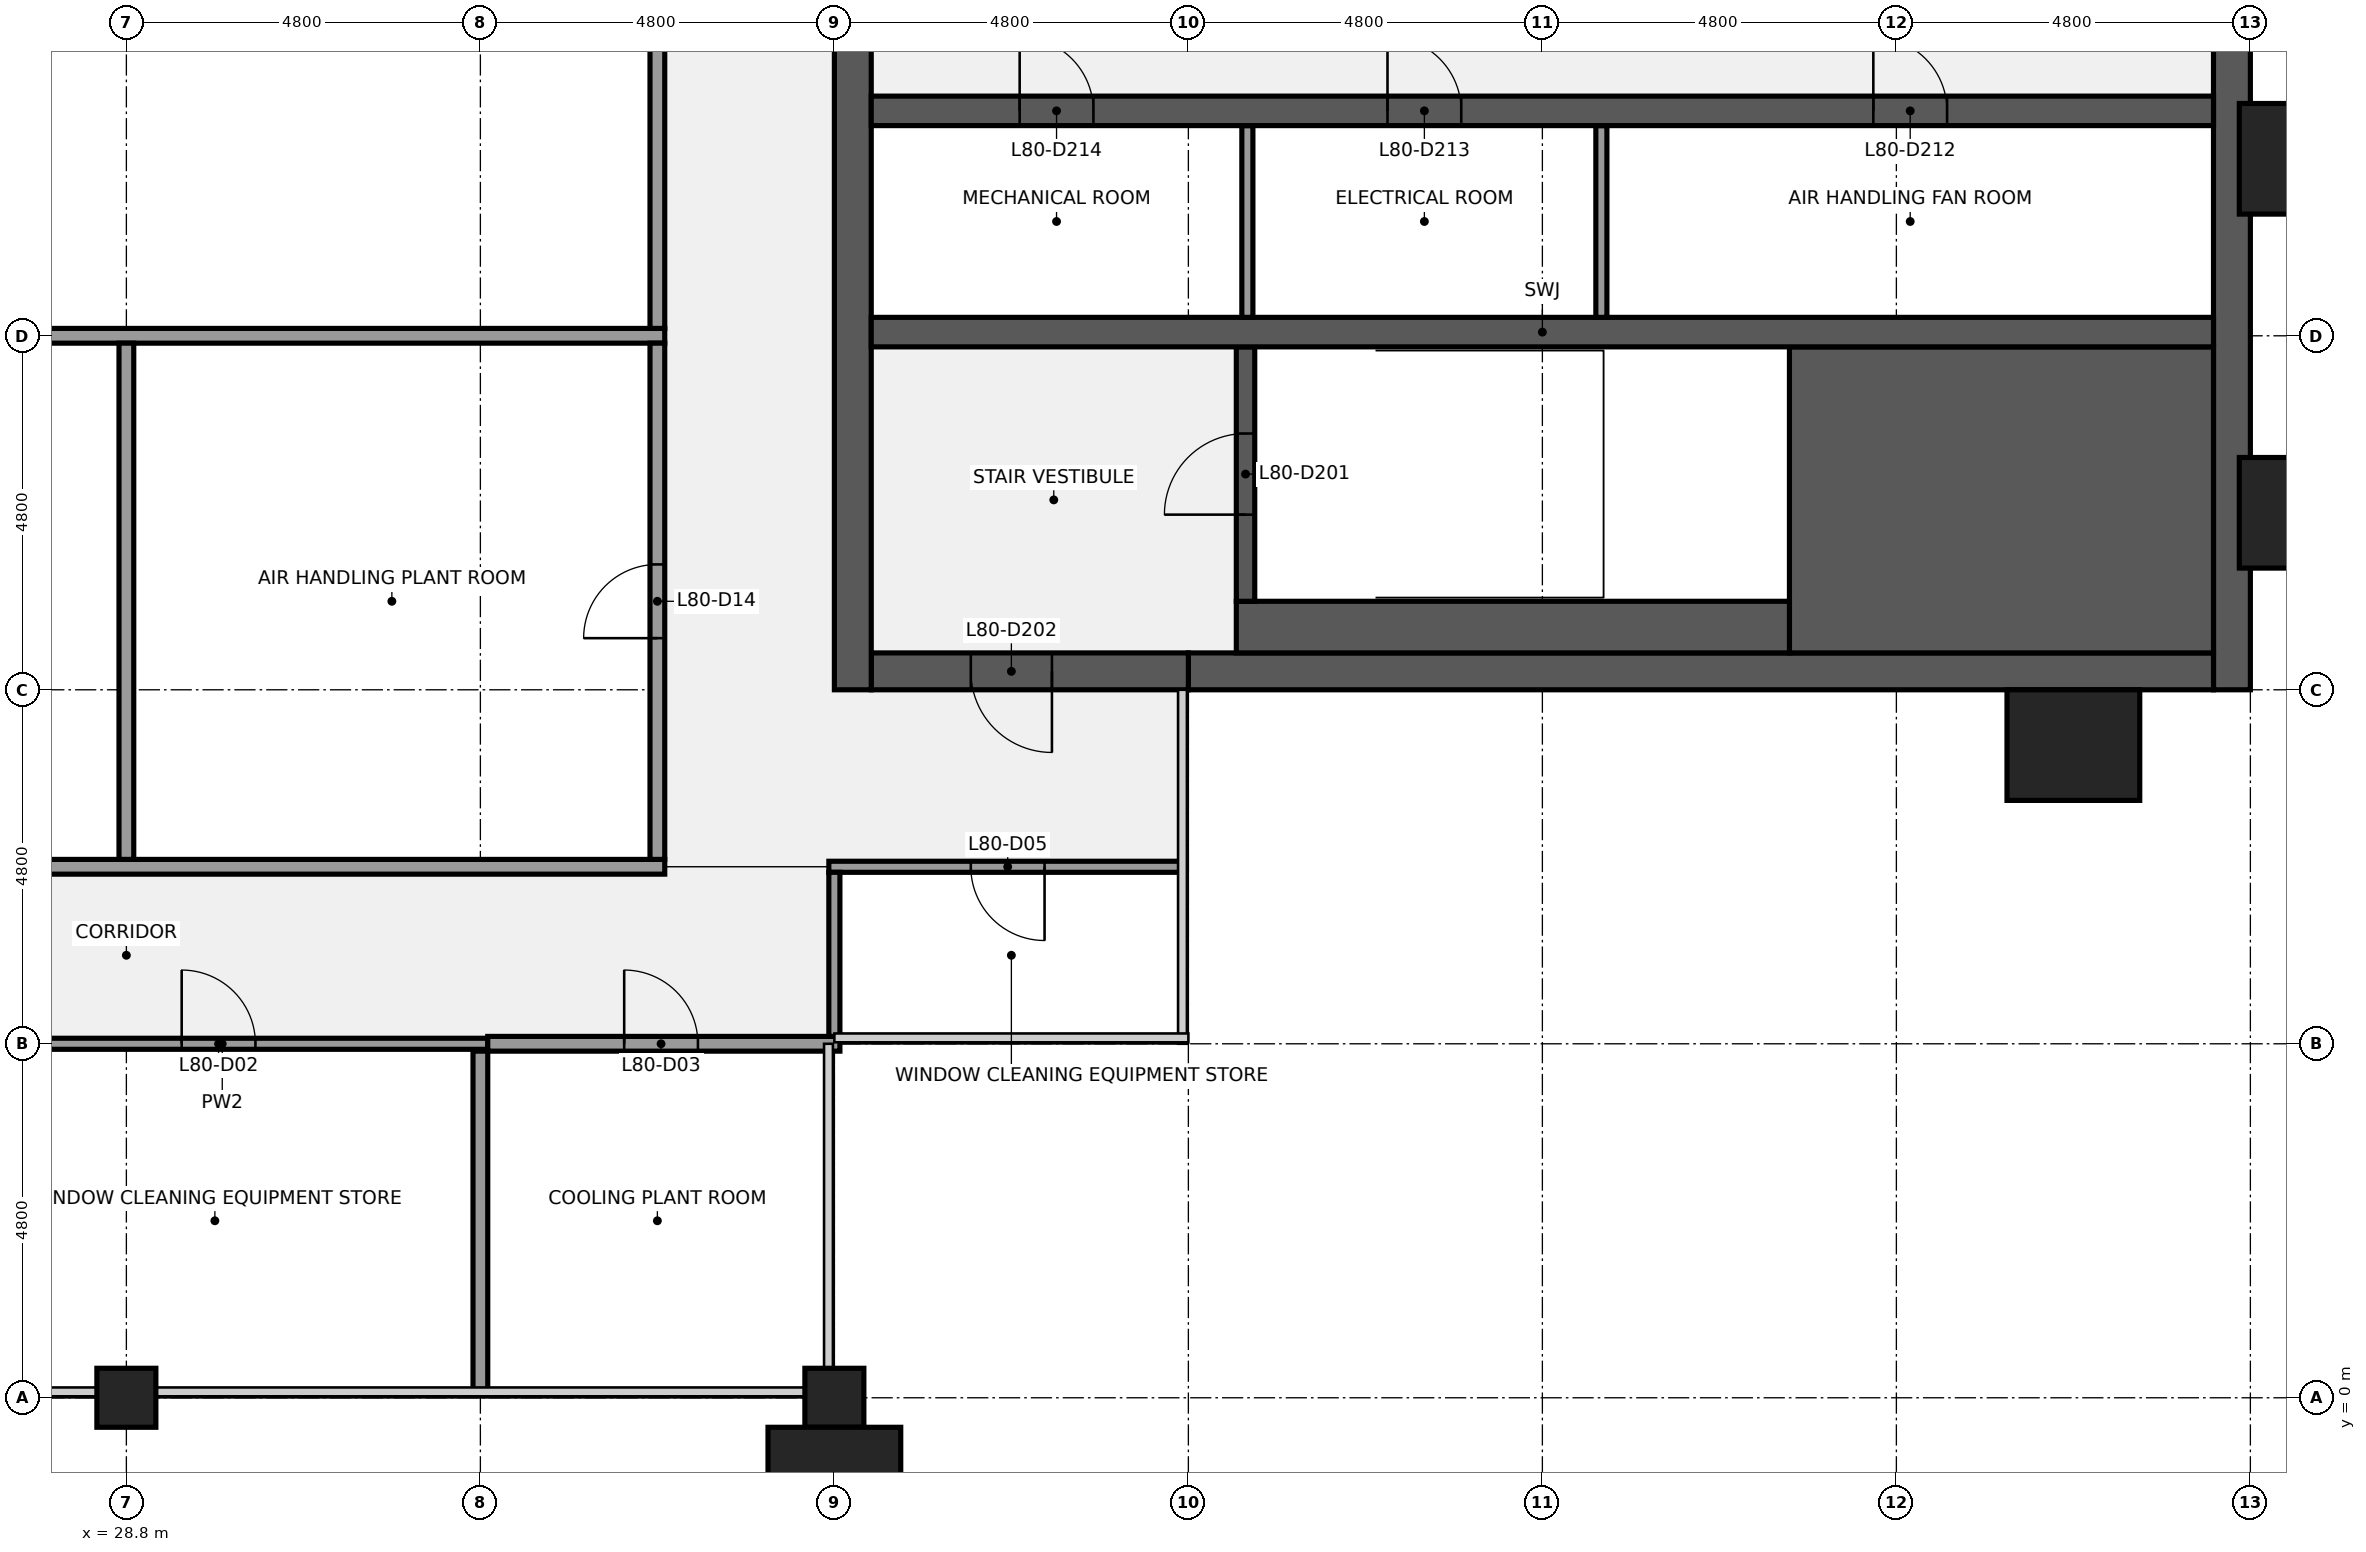
"""IFC4 building model, lengths in metres.
Left out: names, types, materials, properties, quantities, classifications, styles, units other than length and angle.
Written with IfcOpenShell. Run it as: python <this file> out.ifc"""

import sys

from ifc_helpers import new_model, si_unit, direction, frame, frame_2d, origin, origin_2d, place, context, subcontext, project, spatial, rectangle, extrude, element, fill, save


model = new_model("IFC4")
c1 = context("Model", 3, precision=1e-05, world=origin(), true_north=direction((0.0, 1.0)))
c2 = subcontext(c1, "Body", "Model", "MODEL_VIEW")
j1 = project(units=[si_unit("LENGTHUNIT", "METRE"), si_unit("PLANEANGLEUNIT", "RADIAN")], contexts=[c1])
p1 = place(None, origin())
s1 = spatial("IfcSite", under=j1, at=p1, CompositionType="ELEMENT")
p2 = place(p1, origin())
s2 = spatial("IfcBuilding", under=s1, at=p2, CompositionType="ELEMENT")
p3 = place(p2, frame((0.0, 0.0, 358.3)))
s3 = spatial("IfcBuildingStorey", under=s2, at=p3, CompositionType="ELEMENT", Elevation=358.3)
for number, where, z_axis, x_axis in (
    (1, (28.8, 0.0, 0.0), (0.0, 0.0, 1.0), (1.0, 0.0, 0.0)),
    (2, (38.4, 0.0, 0.0), (0.0, 0.0, 1.0), (1.0, 0.0, 0.0)),
):
    element("IfcColumn", number, at=place(p3, frame(where, z_axis=z_axis, x_axis=x_axis)), inside=s3, PredefinedType="COLUMN", context=c2, shape_type="SweptSolid", body=[
        extrude(rectangle(XDim=0.8, YDim=0.8, at=origin_2d()), origin(), (0.0, 0.0, 1.0), 3.942),
    ])
p4 = place(p3, frame((57.35, 38.4, 0.0), z_axis=(0.0, 0.0, 1.0), x_axis=(0.0, -1.0, 0.0)))
e3 = element("IfcWall", 3, at=p4, inside=s3, PredefinedType="SHEAR", context=c2, shape_type="SweptSolid", body=[
    extrude(rectangle(XDim=28.8, YDim=0.5, at=frame_2d((14.4, 0.0))), origin(), (0.0, 0.0, 1.0), 3.75),
])
p5 = place(p3, frame((57.1, 9.85, 0.0), z_axis=(0.0, 0.0, 1.0), x_axis=(-1.0, 0.0, 0.0)))
e4 = element("IfcWall", 4, at=p5, inside=s3, PredefinedType="SHEAR", context=c2, shape_type="SweptSolid", body=[
    extrude(rectangle(XDim=13.9, YDim=0.5, at=frame_2d((6.95, 0.0))), origin(), (0.0, 0.0, 1.0), 3.75),
])
p6 = place(p3, frame((43.2, 9.85, 0.0), z_axis=(0.0, 0.0, 1.0), x_axis=(-1.0, 0.0, 0.0)))
e5 = element("IfcWall", 5, at=p6, inside=s3, PredefinedType="SHEAR", context=c2, shape_type="SweptSolid", body=[
    extrude(rectangle(XDim=4.3, YDim=0.5, at=frame_2d((2.15, 0.0))), origin(), (0.0, 0.0, 1.0), 3.75),
])
p7 = place(p6, frame((1.85, 0.0, 0.0)))
e6 = element("IfcOpeningElement", 6, at=p7, cuts=e5, PredefinedType="OPENING", context=c2, shape_type="SweptSolid", body=[
    extrude(rectangle(XDim=1.1, YDim=2.1, at=frame_2d((0.55, 1.05))), frame((0.0, 0.26, 0.0), z_axis=(0.0, -1.0, 0.0), x_axis=(1.0, 0.0, 0.0)), (0.0, 0.0, 1.0), 0.52),
])
p8 = place(p3, frame((38.65, 9.6, 0.0), z_axis=(0.0, 0.0, 1.0), x_axis=(0.0, 1.0, 0.0)))
e7 = element("IfcWall", 7, at=p8, inside=s3, PredefinedType="SHEAR", context=c2, shape_type="SweptSolid", body=[
    extrude(rectangle(XDim=28.8, YDim=0.5, at=frame_2d((14.4, 0.0))), origin(), (0.0, 0.0, 1.0), 3.75),
])
p9 = place(p8, frame((8.7, 0.0, 0.0)))
e8 = element("IfcOpeningElement", 8, at=p9, cuts=e7, PredefinedType="OPENING", context=c2, shape_type="SweptSolid", body=[
    extrude(rectangle(XDim=1.8, YDim=2.1, at=frame_2d((0.9, 1.05))), frame((0.0, 0.26, 0.0), z_axis=(0.0, -1.0, 0.0), x_axis=(1.0, 0.0, 0.0)), (0.0, 0.0, 1.0), 0.52),
])
p10 = place(p8, frame((18.3, 0.0, 0.0)))
e9 = element("IfcOpeningElement", 9, at=p10, cuts=e7, PredefinedType="OPENING", context=c2, shape_type="SweptSolid", body=[
    extrude(rectangle(XDim=1.8, YDim=2.1, at=frame_2d((0.9, 1.05))), frame((0.0, 0.26, 0.0), z_axis=(0.0, -1.0, 0.0), x_axis=(1.0, 0.0, 0.0)), (0.0, 0.0, 1.0), 0.52),
])
p11 = place(p3, frame((51.35, 12.175, 0.0), z_axis=(0.0, 0.0, 1.0), x_axis=(1.0, 0.0, 0.0)))
e10 = element("IfcWall", 10, at=p11, inside=s3, PredefinedType="SHEAR", context=c2, shape_type="SweptSolid", body=[
    extrude(rectangle(XDim=5.75, YDim=4.15, at=frame_2d((2.875, 0.0))), origin(), (0.0, 0.0, 1.0), 3.75),
])
p12 = place(p3, frame((43.85, 10.45, 0.0), z_axis=(0.0, 0.0, 1.0), x_axis=(1.0, 0.0, 0.0)))
e11 = element("IfcWall", 11, at=p12, inside=s3, PredefinedType="SHEAR", context=c2, shape_type="SweptSolid", body=[
    extrude(rectangle(XDim=7.5, YDim=0.7, at=frame_2d((3.75, 0.0))), origin(), (0.0, 0.0, 1.0), 3.75),
])
p13 = place(p3, frame((43.975, 10.8, 0.0), z_axis=(0.0, 0.0, 1.0), x_axis=(0.0, 1.0, 0.0)))
e12 = element("IfcWall", 12, at=p13, inside=s3, PredefinedType="SHEAR", context=c2, shape_type="SweptSolid", body=[
    extrude(rectangle(XDim=3.45, YDim=0.25, at=frame_2d((1.725, 0.0))), origin(), (0.0, 0.0, 1.0), 3.75),
])
p14 = place(p13, frame((1.175, 0.0, 0.0)))
e13 = element("IfcOpeningElement", 13, at=p14, cuts=e12, PredefinedType="OPENING", context=c2, shape_type="SweptSolid", body=[
    extrude(rectangle(XDim=1.1, YDim=2.1, at=frame_2d((0.55, 1.05))), frame((0.0, 0.135, 0.0), z_axis=(0.0, -1.0, 0.0), x_axis=(1.0, 0.0, 0.0)), (0.0, 0.0, 1.0), 0.27),
])
p15 = place(p3, frame((38.9, 14.45, 0.0), z_axis=(0.0, 0.0, 1.0), x_axis=(1.0, 0.0, 0.0)))
e14 = element("IfcWall", 14, at=p15, inside=s3, PredefinedType="SHEAR", context=c2, shape_type="SweptSolid", body=[
    extrude(rectangle(XDim=18.2, YDim=0.4, at=frame_2d((9.1, 0.0))), origin(), (0.0, 0.0, 1.0), 3.75),
])
for number, where, z_axis, x_axis in (
    (15, (48.8, 14.65, 0.0), (0.0, 0.0, 1.0), (0.0, 1.0, 0.0)),
    (16, (44.0, 14.65, 0.0), (0.0, 0.0, 1.0), (0.0, 1.0, 0.0)),
):
    element("IfcWall", number, at=place(p3, frame(where, z_axis=z_axis, x_axis=x_axis)), inside=s3, PredefinedType="PARTITIONING", context=c2, shape_type="SweptSolid", body=[
        extrude(rectangle(XDim=2.6, YDim=0.15, at=frame_2d((1.3, 0.0))), origin(), (0.0, 0.0, 1.0), 3.75),
    ])
p16 = place(p3, frame((38.9, 17.45, 0.0), z_axis=(0.0, 0.0, 1.0), x_axis=(1.0, 0.0, 0.0)))
e17 = element("IfcWall", 17, at=p16, inside=s3, PredefinedType="SHEAR", context=c2, shape_type="SweptSolid", body=[
    extrude(rectangle(XDim=18.2, YDim=0.4, at=frame_2d((9.1, 0.0))), origin(), (0.0, 0.0, 1.0), 3.75),
])
p17 = place(p16, frame((13.587, 0.0, 0.0)))
e18 = element("IfcOpeningElement", 18, at=p17, cuts=e17, PredefinedType="OPENING", context=c2, shape_type="SweptSolid", body=[
    extrude(rectangle(XDim=1.0, YDim=2.1, at=frame_2d((0.5, 1.05))), frame((0.0, 0.21, 0.0), z_axis=(0.0, -1.0, 0.0), x_axis=(1.0, 0.0, 0.0)), (0.0, 0.0, 1.0), 0.42),
])
p18 = place(p16, frame((7.0, 0.0, 0.0)))
e19 = element("IfcOpeningElement", 19, at=p18, cuts=e17, PredefinedType="OPENING", context=c2, shape_type="SweptSolid", body=[
    extrude(rectangle(XDim=1.0, YDim=2.1, at=frame_2d((0.5, 1.05))), frame((0.0, 0.21, 0.0), z_axis=(0.0, -1.0, 0.0), x_axis=(1.0, 0.0, 0.0)), (0.0, 0.0, 1.0), 0.42),
])
p19 = place(p16, frame((2.012, 0.0, 0.0)))
e20 = element("IfcOpeningElement", 20, at=p19, cuts=e17, PredefinedType="OPENING", context=c2, shape_type="SweptSolid", body=[
    extrude(rectangle(XDim=1.0, YDim=2.1, at=frame_2d((0.5, 1.05))), frame((0.0, 0.21, 0.0), z_axis=(0.0, -1.0, 0.0), x_axis=(1.0, 0.0, 0.0)), (0.0, 0.0, 1.0), 0.42),
])
p20 = place(p3, frame((26.5, 4.8, 0.0), z_axis=(0.0, 0.0, 1.0), x_axis=(1.0, 0.0, 0.0)))
e21 = element("IfcWall", 21, at=p20, inside=s3, PredefinedType="PARTITIONING", context=c2, shape_type="SweptSolid", body=[
    extrude(rectangle(XDim=7.2, YDim=0.15, at=frame_2d((3.6, 0.0))), origin(), (0.0, 0.0, 1.0), 2.759),
])
p21 = place(p20, frame((3.05, 0.0, 0.0)))
e22 = element("IfcOpeningElement", 22, at=p21, cuts=e21, PredefinedType="OPENING", context=c2, shape_type="SweptSolid", body=[
    extrude(rectangle(XDim=1.0, YDim=2.1, at=frame_2d((0.5, 1.05))), frame((0.0, 0.085, 0.0), z_axis=(0.0, -1.0, 0.0), x_axis=(1.0, 0.0, 0.0)), (0.0, 0.0, 1.0), 0.17),
])
p22 = place(p3, frame((33.7, 4.8, 0.0), z_axis=(0.0, 0.0, 1.0), x_axis=(1.0, 0.0, 0.0)))
e23 = element("IfcWall", 23, at=p22, inside=s3, PredefinedType="PARTITIONING", context=c2, shape_type="SweptSolid", body=[
    extrude(rectangle(XDim=4.775, YDim=0.2, at=frame_2d((2.388, 0.0))), origin(), (0.0, 0.0, 1.0), 2.759),
])
p23 = place(p22, frame((1.85, 0.0, 0.0)))
e24 = element("IfcOpeningElement", 24, at=p23, cuts=e23, PredefinedType="OPENING", context=c2, shape_type="SweptSolid", body=[
    extrude(rectangle(XDim=1.0, YDim=2.1, at=frame_2d((0.5, 1.05))), frame((0.0, 0.11, 0.0), z_axis=(0.0, -1.0, 0.0), x_axis=(1.0, 0.0, 0.0)), (0.0, 0.0, 1.0), 0.22),
])
p24 = place(p3, frame((38.325, 7.2, 0.0), z_axis=(0.0, 0.0, 1.0), x_axis=(1.0, 0.0, 0.0)))
e25 = element("IfcWall", 25, at=p24, inside=s3, PredefinedType="PARTITIONING", context=c2, shape_type="SweptSolid", body=[
    extrude(rectangle(XDim=4.775, YDim=0.15, at=frame_2d((2.388, 0.0))), origin(), (0.0, 0.0, 1.0), 2.759),
])
p25 = place(p24, frame((1.925, 0.0, 0.0)))
e26 = element("IfcOpeningElement", 26, at=p25, cuts=e25, PredefinedType="OPENING", context=c2, shape_type="SweptSolid", body=[
    extrude(rectangle(XDim=1.0, YDim=2.1, at=frame_2d((0.5, 1.05))), frame((0.0, 0.085, 0.0), z_axis=(0.0, -1.0, 0.0), x_axis=(1.0, 0.0, 0.0)), (0.0, 0.0, 1.0), 0.17),
])
for number, where, z_axis, x_axis in (
    (27, (21.5, 7.2, 0.0), (0.0, 0.0, 1.0), (1.0, 0.0, 0.0)),
    (28, (21.5, 14.4, 0.0), (0.0, 0.0, 1.0), (1.0, 0.0, 0.0)),
):
    element("IfcWall", number, at=place(p3, frame(where, z_axis=z_axis, x_axis=x_axis)), inside=s3, PredefinedType="PARTITIONING", context=c2, shape_type="SweptSolid", body=[
        extrude(rectangle(XDim=14.6, YDim=0.2, at=frame_2d((7.3, 0.0))), origin(), (0.0, 0.0, 1.0), 2.759),
    ])
p26 = place(p3, frame((28.8, 7.3, 0.0), z_axis=(0.0, 0.0, 1.0), x_axis=(0.0, 1.0, 0.0)))
e29 = element("IfcWall", 29, at=p26, inside=s3, PredefinedType="PARTITIONING", context=c2, shape_type="SweptSolid", body=[
    extrude(rectangle(XDim=7.0, YDim=0.2, at=frame_2d((3.5, 0.0))), origin(), (0.0, 0.0, 1.0), 2.759),
])
p27 = place(p3, frame((33.6, 0.1, 0.0), z_axis=(0.0, 0.0, 1.0), x_axis=(0.0, 1.0, 0.0)))
e30 = element("IfcWall", 30, at=p27, inside=s3, PredefinedType="PARTITIONING", context=c2, shape_type="SweptSolid", body=[
    extrude(rectangle(XDim=4.6, YDim=0.2, at=frame_2d((2.3, 0.0))), origin(), (0.0, 0.0, 1.0), 2.759),
])
p28 = place(p3, frame((36.0, 7.3, 0.0), z_axis=(0.0, 0.0, 1.0), x_axis=(0.0, 1.0, 0.0)))
e31 = element("IfcWall", 31, at=p28, inside=s3, PredefinedType="PARTITIONING", context=c2, shape_type="SweptSolid", body=[
    extrude(rectangle(XDim=7.0, YDim=0.2, at=frame_2d((3.5, 0.0))), origin(), (0.0, 0.0, 1.0), 2.759),
])
p29 = place(p28, frame((3.0, 0.0, 0.0)))
e32 = element("IfcOpeningElement", 32, at=p29, cuts=e31, PredefinedType="OPENING", context=c2, shape_type="SweptSolid", body=[
    extrude(rectangle(XDim=1.0, YDim=2.1, at=frame_2d((0.5, 1.05))), frame((0.0, 0.11, 0.0), z_axis=(0.0, -1.0, 0.0), x_axis=(1.0, 0.0, 0.0)), (0.0, 0.0, 1.0), 0.22),
])
p30 = place(p3, frame((36.0, 14.5, 0.0), z_axis=(0.0, 0.0, 1.0), x_axis=(0.0, 1.0, 0.0)))
e33 = element("IfcWall", 33, at=p30, inside=s3, PredefinedType="PARTITIONING", context=c2, shape_type="SweptSolid", body=[
    extrude(rectangle(XDim=9.4, YDim=0.2, at=frame_2d((4.7, 0.0))), origin(), (0.0, 0.0, 1.0), 2.759),
])
p31 = place(p3, frame((38.4, 4.9, 0.0), z_axis=(0.0, 0.0, 1.0), x_axis=(0.0, 1.0, 0.0)))
e34 = element("IfcWall", 34, at=p31, inside=s3, PredefinedType="PARTITIONING", context=c2, shape_type="SweptSolid", body=[
    extrude(rectangle(XDim=2.225, YDim=0.15, at=frame_2d((1.113, 0.0))), origin(), (0.0, 0.0, 1.0), 2.759),
])
for number, where, z_axis, x_axis in (
    (35, (55.2, 8.85, 0.0), (0.0, 0.0, 1.0), (1.0, 0.0, 0.0)),
    (36, (58.35, 12.0, 0.0), (0.0, 0.0, 1.0), (0.0, 1.0, 0.0)),
    (37, (58.35, 16.8, 0.0), (0.0, 0.0, 1.0), (0.0, 1.0, 0.0)),
):
    element("IfcColumn", number, at=place(p3, frame(where, z_axis=z_axis, x_axis=x_axis)), inside=s3, PredefinedType="PILASTER", context=c2, shape_type="SweptSolid", body=[
        extrude(rectangle(XDim=1.8, YDim=1.5, at=origin_2d()), origin(), (0.0, 0.0, 1.0), 4.0),
    ])
p32 = place(p3, frame((38.4, -0.95, 0.0), z_axis=(0.0, 0.0, 1.0), x_axis=(1.0, 0.0, 0.0)))
e38 = element("IfcColumn", 38, at=p32, inside=s3, PredefinedType="PILASTER", context=c2, shape_type="SweptSolid", body=[
    extrude(rectangle(XDim=1.8, YDim=1.1, at=origin_2d()), origin(), (0.0, 0.0, 1.0), 4.0),
])
p33 = place(p14, origin())
e39 = element("IfcDoor", 39, at=p33, inside=s3, OperationType="SINGLE_SWING_LEFT", PredefinedType="DOOR", context=c2, shape_type="SweptSolid", body=[
    extrude(rectangle(XDim=1.1, YDim=2.1, at=frame_2d((0.55, 1.05))), frame((0.0, 0.025, 0.0), z_axis=(0.0, -1.0, 0.0), x_axis=(1.0, 0.0, 0.0)), (0.0, 0.0, 1.0), 0.05),
])
fill(e13, e39)
p34 = place(p7, origin())
e40 = element("IfcDoor", 40, at=p34, inside=s3, OperationType="SINGLE_SWING_LEFT", PredefinedType="DOOR", context=c2, shape_type="SweptSolid", body=[
    extrude(rectangle(XDim=1.1, YDim=2.1, at=frame_2d((0.55, 1.05))), frame((0.0, 0.025, 0.0), z_axis=(0.0, -1.0, 0.0), x_axis=(1.0, 0.0, 0.0)), (0.0, 0.0, 1.0), 0.05),
])
fill(e6, e40)
p35 = place(p17, origin())
e41 = element("IfcDoor", 41, at=p35, inside=s3, OperationType="SINGLE_SWING_LEFT", PredefinedType="DOOR", context=c2, shape_type="SweptSolid", body=[
    extrude(rectangle(XDim=1.0, YDim=2.1, at=frame_2d((0.5, 1.05))), frame((0.0, 0.025, 0.0), z_axis=(0.0, -1.0, 0.0), x_axis=(1.0, 0.0, 0.0)), (0.0, 0.0, 1.0), 0.05),
])
fill(e18, e41)
p36 = place(p18, origin())
e42 = element("IfcDoor", 42, at=p36, inside=s3, OperationType="SINGLE_SWING_LEFT", PredefinedType="DOOR", context=c2, shape_type="SweptSolid", body=[
    extrude(rectangle(XDim=1.0, YDim=2.1, at=frame_2d((0.5, 1.05))), frame((0.0, 0.025, 0.0), z_axis=(0.0, -1.0, 0.0), x_axis=(1.0, 0.0, 0.0)), (0.0, 0.0, 1.0), 0.05),
])
fill(e19, e42)
p37 = place(p19, origin())
e43 = element("IfcDoor", 43, at=p37, inside=s3, OperationType="SINGLE_SWING_LEFT", PredefinedType="DOOR", context=c2, shape_type="SweptSolid", body=[
    extrude(rectangle(XDim=1.0, YDim=2.1, at=frame_2d((0.5, 1.05))), frame((0.0, 0.025, 0.0), z_axis=(0.0, -1.0, 0.0), x_axis=(1.0, 0.0, 0.0)), (0.0, 0.0, 1.0), 0.05),
])
fill(e20, e43)
p38 = place(p21, origin())
e44 = element("IfcDoor", 44, at=p38, inside=s3, OperationType="SINGLE_SWING_LEFT", PredefinedType="DOOR", context=c2, shape_type="SweptSolid", body=[
    extrude(rectangle(XDim=1.0, YDim=2.1, at=frame_2d((0.5, 1.05))), frame((0.0, 0.025, 0.0), z_axis=(0.0, -1.0, 0.0), x_axis=(1.0, 0.0, 0.0)), (0.0, 0.0, 1.0), 0.05),
])
fill(e22, e44)
p39 = place(p23, origin())
e45 = element("IfcDoor", 45, at=p39, inside=s3, OperationType="SINGLE_SWING_LEFT", PredefinedType="DOOR", context=c2, shape_type="SweptSolid", body=[
    extrude(rectangle(XDim=1.0, YDim=2.1, at=frame_2d((0.5, 1.05))), frame((0.0, 0.025, 0.0), z_axis=(0.0, -1.0, 0.0), x_axis=(1.0, 0.0, 0.0)), (0.0, 0.0, 1.0), 0.05),
])
fill(e24, e45)
p40 = place(p25, origin())
e46 = element("IfcDoor", 46, at=p40, inside=s3, OperationType="SINGLE_SWING_RIGHT", PredefinedType="DOOR", context=c2, shape_type="SweptSolid", body=[
    extrude(rectangle(XDim=1.0, YDim=2.1, at=frame_2d((0.5, 1.05))), frame((0.0, 0.025, 0.0), z_axis=(0.0, -1.0, 0.0), x_axis=(1.0, 0.0, 0.0)), (0.0, 0.0, 1.0), 0.05),
])
fill(e26, e46)
p41 = place(p29, origin())
e47 = element("IfcDoor", 47, at=p41, inside=s3, OperationType="SINGLE_SWING_LEFT", PredefinedType="DOOR", context=c2, shape_type="SweptSolid", body=[
    extrude(rectangle(XDim=1.0, YDim=2.1, at=frame_2d((0.5, 1.05))), frame((0.0, 0.025, 0.0), z_axis=(0.0, -1.0, 0.0), x_axis=(1.0, 0.0, 0.0)), (0.0, 0.0, 1.0), 0.05),
])
fill(e32, e47)
save(model, sys.argv[1])
